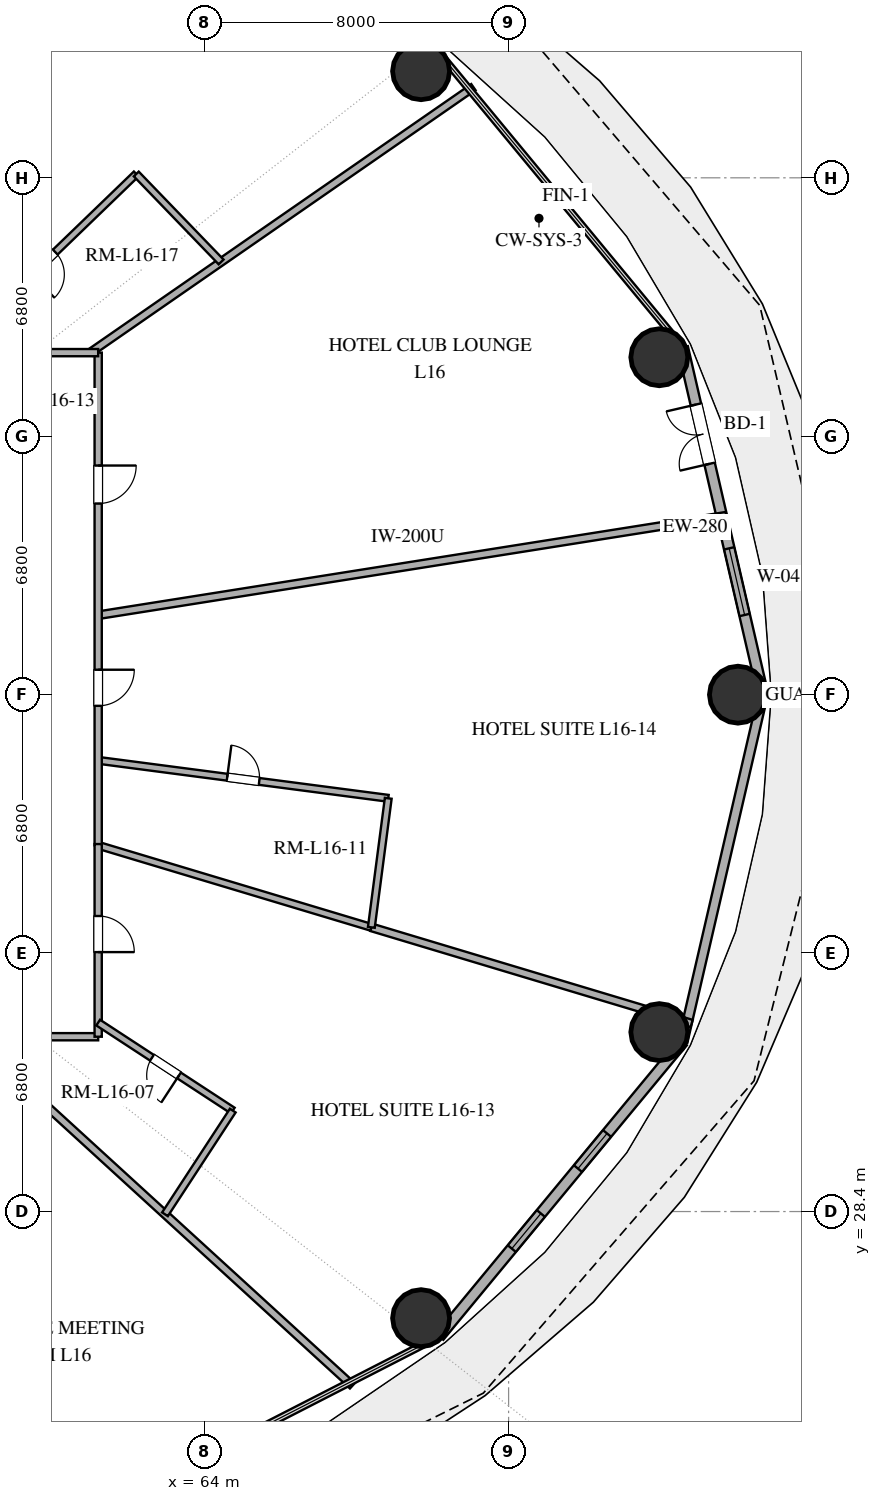
"""IFC4 building model, lengths in metres.
Left out: names, types, materials, properties, quantities, classifications, styles, units other than length and angle.
Written with IfcOpenShell. Run it as: python <this file> out.ifc"""

import sys

from ifc_helpers import new_model, si_unit, direction, frame, frame_2d, origin, origin_2d, place, context, subcontext, project, spatial, rectangle, hollow_circle, extrude, element, fill, save


model = new_model("IFC4")
c1 = context("Model", 3, precision=1e-05, world=origin(), true_north=direction((0.0, 1.0)))
c2 = subcontext(c1, "Body", "Model", "MODEL_VIEW")
j1 = project(units=[si_unit("LENGTHUNIT", "METRE"), si_unit("PLANEANGLEUNIT", "RADIAN")], contexts=[c1])
p1 = place(None, origin())
s1 = spatial("IfcSite", under=j1, at=p1, CompositionType="ELEMENT")
p2 = place(p1, origin())
s2 = spatial("IfcBuilding", under=s1, at=p2, CompositionType="ELEMENT")
p3 = place(p2, frame((0.0, 0.0, 67.8)))
s3 = spatial("IfcBuildingStorey", under=s2, at=p3, CompositionType="ELEMENT", Elevation=67.8)
for number, where, z_axis, x_axis in (
    (1, (78.035, 42.0, 0.0), (0.0, 0.0, 1.0), (1.0, 0.0, 0.0)),
    (2, (75.966, 50.878, 0.0), (0.0, 0.0, 1.0), (1.0, 0.0, 0.0)),
    (3, (69.697, 58.405, 0.0), (0.0, 0.0, 1.0), (1.0, 0.0, 0.0)),
    (4, (69.697, 25.595, 0.0), (0.0, 0.0, 1.0), (1.0, 0.0, 0.0)),
    (5, (75.966, 33.122, 0.0), (0.0, 0.0, 1.0), (1.0, 0.0, 0.0)),
):
    element("IfcColumn", number, at=place(p3, frame(where, z_axis=z_axis, x_axis=x_axis)), inside=s3, PredefinedType="COLUMN", context=c2, shape_type="SweptSolid", body=[
        extrude(hollow_circle(Radius=0.75, WallThickness=0.04, at=origin_2d()), origin(), (0.0, 0.0, 1.0), 3.38),
    ])
p4 = place(p3, frame((78.696, 42.0, 0.0), z_axis=(0.0, 0.0, 1.0), x_axis=(-0.225454452941, 0.974253709076, 0.0)))
e6 = element("IfcWall", 6, at=p4, inside=s3, PredefinedType="SOLIDWALL", context=c2, shape_type="SweptSolid", body=[
    extrude(rectangle(XDim=9.38, YDim=0.28, at=frame_2d((4.69, 0.0))), origin(), (0.0, 0.0, 1.0), 3.38),
])
p5 = place(p4, frame((2.152, 0.0, 0.85)))
e7 = element("IfcOpeningElement", 7, at=p5, cuts=e6, PredefinedType="OPENING", context=c2, shape_type="SweptSolid", body=[
    extrude(rectangle(XDim=1.8, YDim=2.2, at=frame_2d((0.9, 1.1))), frame((0.0, 0.15, 0.0), z_axis=(0.0, -1.0, 0.0), x_axis=(1.0, 0.0, 0.0)), (0.0, 0.0, 1.0), 0.3),
])
p6 = place(p4, frame((6.235, 0.0, 0.0)))
e8 = element("IfcOpeningElement", 8, at=p6, cuts=e6, PredefinedType="OPENING", context=c2, shape_type="SweptSolid", body=[
    extrude(rectangle(XDim=1.6, YDim=2.25, at=frame_2d((0.8, 1.125))), frame((0.0, 0.15, 0.0), z_axis=(0.0, -1.0, 0.0), x_axis=(1.0, 0.0, 0.0)), (0.0, 0.0, 1.0), 0.3),
])
p7 = place(p3, frame((70.174, 58.886, 0.0), z_axis=(0.0, 0.0, 1.0), x_axis=(-0.889853976658, 0.456245438581, 0.0)))
e9 = element("IfcWall", 9, at=p7, inside=s3, PredefinedType="SOLIDWALL", context=c2, shape_type="SweptSolid", body=[
    extrude(rectangle(XDim=11.346, YDim=0.28, at=frame_2d((5.673, 0.0))), origin(), (0.0, 0.0, 1.0), 3.38),
])
p8 = place(p7, frame((3.367, 0.0, 0.85)))
e10 = element("IfcOpeningElement", 10, at=p8, cuts=e9, PredefinedType="OPENING", context=c2, shape_type="SweptSolid", body=[
    extrude(rectangle(XDim=1.5, YDim=2.0, at=frame_2d((0.75, 1.0))), frame((0.0, 0.15, 0.0), z_axis=(0.0, -1.0, 0.0), x_axis=(1.0, 0.0, 0.0)), (0.0, 0.0, 1.0), 0.3),
])
p9 = place(p7, frame((6.629, 0.0, 0.85)))
e11 = element("IfcOpeningElement", 11, at=p9, cuts=e9, PredefinedType="OPENING", context=c2, shape_type="SweptSolid", body=[
    extrude(rectangle(XDim=1.5, YDim=2.0, at=frame_2d((0.75, 1.0))), frame((0.0, 0.15, 0.0), z_axis=(0.0, -1.0, 0.0), x_axis=(1.0, 0.0, 0.0)), (0.0, 0.0, 1.0), 0.3),
])
p10 = place(p3, frame((70.174, 25.114, 0.0), z_axis=(0.0, 0.0, 1.0), x_axis=(0.637296809613, 0.770618437657, 0.0)))
e12 = element("IfcWall", 12, at=p10, inside=s3, PredefinedType="SOLIDWALL", context=c2, shape_type="SweptSolid", body=[
    extrude(rectangle(XDim=10.053, YDim=0.28, at=frame_2d((5.027, 0.0))), origin(), (0.0, 0.0, 1.0), 3.38),
])
p11 = place(p10, frame((2.998, 0.0, 0.85)))
e13 = element("IfcOpeningElement", 13, at=p11, cuts=e12, PredefinedType="OPENING", context=c2, shape_type="SweptSolid", body=[
    extrude(rectangle(XDim=1.2, YDim=1.6, at=frame_2d((0.6, 0.8))), frame((0.0, 0.15, 0.0), z_axis=(0.0, -1.0, 0.0), x_axis=(1.0, 0.0, 0.0)), (0.0, 0.0, 1.0), 0.3),
])
p12 = place(p10, frame((5.73, 0.0, 0.85)))
e14 = element("IfcOpeningElement", 14, at=p12, cuts=e12, PredefinedType="OPENING", context=c2, shape_type="SweptSolid", body=[
    extrude(rectangle(XDim=1.2, YDim=1.6, at=frame_2d((0.6, 0.8))), frame((0.0, 0.15, 0.0), z_axis=(0.0, -1.0, 0.0), x_axis=(1.0, 0.0, 0.0)), (0.0, 0.0, 1.0), 0.3),
])
p13 = place(p3, frame((76.581, 32.862, 0.0), z_axis=(0.0, 0.0, 1.0), x_axis=(0.225454452941, 0.974253709076, 0.0)))
e15 = element("IfcWall", 15, at=p13, inside=s3, PredefinedType="SOLIDWALL", context=c2, shape_type="SweptSolid", body=[
    extrude(rectangle(XDim=9.38, YDim=0.25, at=frame_2d((4.69, 0.0))), origin(), (0.0, 0.0, 1.0), 3.38),
])
p14 = place(p3, frame((61.2, 44.091, 0.0), z_axis=(0.0, 0.0, 1.0), x_axis=(0.987690823911, 0.156418785194, 0.0)))
e16 = element("IfcWall", 16, at=p14, inside=s3, PredefinedType="PARTITIONING", context=c2, shape_type="SweptSolid", body=[
    extrude(rectangle(XDim=16.735, YDim=0.2, at=frame_2d((8.368, 0.0))), origin(), (0.0, 0.0, 1.0), 2.74),
])
p15 = place(p3, frame((76.816, 33.347, 0.0), z_axis=(0.0, 0.0, 1.0), x_axis=(-0.957749889613, 0.287602414708, 0.0)))
e17 = element("IfcWall", 17, at=p15, inside=s3, PredefinedType="PARTITIONING", context=c2, shape_type="SweptSolid", body=[
    extrude(rectangle(XDim=8.8, YDim=0.2, at=frame_2d((4.4, 0.0))), origin(), (0.0, 0.0, 1.0), 2.74),
])
p16 = place(p3, frame((53.107, 51.0, 0.0), z_axis=(0.0, 0.0, 1.0), x_axis=(0.493512300658, 0.869738816599, 0.0)))
e18 = element("IfcWall", 18, at=p16, inside=s3, PredefinedType="PARTITIONING", context=c2, shape_type="SweptSolid", body=[
    extrude(rectangle(XDim=14.938, YDim=0.2, at=frame_2d((7.469, 0.0))), origin(), (0.0, 0.0, 1.0), 2.74),
])
p17 = place(p3, frame((60.991, 51.0, 0.0), z_axis=(0.0, 0.0, 1.0), x_axis=(0.821999402566, 0.569488351226, 0.0)))
e19 = element("IfcWall", 19, at=p17, inside=s3, PredefinedType="PARTITIONING", context=c2, shape_type="SweptSolid", body=[
    extrude(rectangle(XDim=12.266, YDim=0.2, at=frame_2d((6.133, 0.0))), origin(), (0.0, 0.0, 1.0), 2.74),
])
p18 = place(p3, frame((61.2, 40.272, 0.0), z_axis=(0.0, 0.0, 1.0), x_axis=(0.991543548491, -0.129774386708, 0.0)))
e20 = element("IfcWall", 20, at=p18, inside=s3, PredefinedType="PLUMBINGWALL", context=c2, shape_type="SweptSolid", body=[
    extrude(rectangle(XDim=7.698, YDim=0.18, at=frame_2d((3.849, 0.0))), origin(), (0.0, 0.0, 1.0), 2.74),
])
p19 = place(p18, frame((3.424, 0.0, 0.0)))
e21 = element("IfcOpeningElement", 21, at=p19, cuts=e20, PredefinedType="OPENING", context=c2, shape_type="SweptSolid", body=[
    extrude(rectangle(XDim=0.85, YDim=2.1, at=frame_2d((0.425, 1.05))), frame((0.0, 0.1, 0.0), z_axis=(0.0, -1.0, 0.0), x_axis=(1.0, 0.0, 0.0)), (0.0, 0.0, 1.0), 0.2),
])
p20 = place(p3, frame((68.388, 35.878, 0.0), z_axis=(0.0, 0.0, 1.0), x_axis=(-0.95775642604, 0.28758064674, 0.0)))
e22 = element("IfcWall", 22, at=p20, inside=s3, PredefinedType="PLUMBINGWALL", context=c2, shape_type="SweptSolid", body=[
    extrude(rectangle(XDim=7.506, YDim=0.18, at=frame_2d((3.753, 0.0))), origin(), (0.0, 0.0, 1.0), 2.74),
])
p21 = place(p3, frame((57.846, 33.0, 0.0), z_axis=(0.0, 0.0, 1.0), x_axis=(0.738119160364, -0.674670367738, 0.0)))
e23 = element("IfcWall", 23, at=p21, inside=s3, PredefinedType="PARTITIONING", context=c2, shape_type="SweptSolid", body=[
    extrude(rectangle(XDim=13.61, YDim=0.2, at=frame_2d((6.805, 0.0))), origin(), (0.0, 0.0, 1.0), 2.74),
])
p22 = place(p3, frame((61.2, 51.0, 0.0), z_axis=(0.0, 0.0, 1.0), x_axis=(0.0, -1.0, 0.0)))
e24 = element("IfcWall", 24, at=p22, inside=s3, PredefinedType="PARTITIONING", context=c2, shape_type="SweptSolid", body=[
    extrude(rectangle(XDim=12.964, YDim=0.19, at=frame_2d((6.482, 0.0))), origin(), (0.0, 0.0, 1.0), 2.74),
])
p23 = place(p22, frame((2.971, 0.0, 0.0)))
e25 = element("IfcOpeningElement", 25, at=p23, cuts=e24, PredefinedType="OPENING", context=c2, shape_type="SweptSolid", body=[
    extrude(rectangle(XDim=1.0, YDim=2.2, at=frame_2d((0.5, 1.1))), frame((0.0, 0.105, 0.0), z_axis=(0.0, -1.0, 0.0), x_axis=(1.0, 0.0, 0.0)), (0.0, 0.0, 1.0), 0.21),
])
p24 = place(p22, frame((8.344, 0.0, 0.0)))
e26 = element("IfcOpeningElement", 26, at=p24, cuts=e24, PredefinedType="OPENING", context=c2, shape_type="SweptSolid", body=[
    extrude(rectangle(XDim=0.95, YDim=2.15, at=frame_2d((0.475, 1.075))), frame((0.0, 0.105, 0.0), z_axis=(0.0, -1.0, 0.0), x_axis=(1.0, 0.0, 0.0)), (0.0, 0.0, 1.0), 0.21),
])
p25 = place(p3, frame((62.202, 55.701, 0.0), z_axis=(0.0, 0.0, 1.0), x_axis=(-0.719667322044, -0.69431905172, 0.0)))
e27 = element("IfcWall", 27, at=p25, inside=s3, PredefinedType="PLUMBINGWALL", context=c2, shape_type="SweptSolid", body=[
    extrude(rectangle(XDim=6.771, YDim=0.18, at=frame_2d((3.385, 0.0))), origin(), (0.0, 0.0, 1.0), 2.74),
])
p26 = place(p25, frame((2.96, 0.0, 0.0)))
e28 = element("IfcOpeningElement", 28, at=p26, cuts=e27, PredefinedType="OPENING", context=c2, shape_type="SweptSolid", body=[
    extrude(rectangle(XDim=0.85, YDim=2.1, at=frame_2d((0.425, 1.05))), frame((0.0, 0.1, 0.0), z_axis=(0.0, -1.0, 0.0), x_axis=(1.0, 0.0, 0.0)), (0.0, 0.0, 1.0), 0.2),
])
p27 = place(p3, frame((61.2, 33.0, 0.0), z_axis=(0.0, 0.0, 1.0), x_axis=(-1.0, 0.0, 0.0)))
e29 = element("IfcWall", 29, at=p27, inside=s3, PredefinedType="PARTITIONING", context=c2, shape_type="SweptSolid", body=[
    extrude(rectangle(XDim=13.839, YDim=0.19, at=frame_2d((6.919, 0.0))), origin(), (0.0, 0.0, 1.0), 2.74),
])
p28 = place(p27, frame((5.965, 0.0, 0.0)))
e30 = element("IfcOpeningElement", 30, at=p28, cuts=e29, PredefinedType="OPENING", context=c2, shape_type="SweptSolid", body=[
    extrude(rectangle(XDim=1.0, YDim=2.2, at=frame_2d((0.5, 1.1))), frame((0.0, 0.105, 0.0), z_axis=(0.0, -1.0, 0.0), x_axis=(1.0, 0.0, 0.0)), (0.0, 0.0, 1.0), 0.21),
])
p29 = place(p27, frame((10.493, 0.0, 0.0)))
e31 = element("IfcOpeningElement", 31, at=p29, cuts=e29, PredefinedType="OPENING", context=c2, shape_type="SweptSolid", body=[
    extrude(rectangle(XDim=0.95, YDim=2.15, at=frame_2d((0.475, 1.075))), frame((0.0, 0.105, 0.0), z_axis=(0.0, -1.0, 0.0), x_axis=(1.0, 0.0, 0.0)), (0.0, 0.0, 1.0), 0.21),
])
p30 = place(p3, frame((61.2, 38.07, 0.0), z_axis=(0.0, 0.0, 1.0), x_axis=(0.0, -1.0, 0.0)))
e32 = element("IfcWall", 32, at=p30, inside=s3, PredefinedType="PARTITIONING", context=c2, shape_type="SweptSolid", body=[
    extrude(rectangle(XDim=5.07, YDim=0.19, at=frame_2d((2.535, 0.0))), origin(), (0.0, 0.0, 1.0), 2.74),
])
p31 = place(p30, frame((1.893, 0.0, 0.0)))
e33 = element("IfcOpeningElement", 33, at=p31, cuts=e32, PredefinedType="OPENING", context=c2, shape_type="SweptSolid", body=[
    extrude(rectangle(XDim=0.95, YDim=2.15, at=frame_2d((0.475, 1.075))), frame((0.0, 0.105, 0.0), z_axis=(0.0, -1.0, 0.0), x_axis=(1.0, 0.0, 0.0)), (0.0, 0.0, 1.0), 0.21),
])
p32 = place(p3, frame((51.298, 51.0, 0.0), z_axis=(0.0, 0.0, 1.0), x_axis=(1.0, 0.0, 0.0)))
e34 = element("IfcWall", 34, at=p32, inside=s3, PredefinedType="PARTITIONING", context=c2, shape_type="SweptSolid", body=[
    extrude(rectangle(XDim=9.902, YDim=0.19, at=frame_2d((4.951, 0.0))), origin(), (0.0, 0.0, 1.0), 2.74),
])
p33 = place(p32, frame((3.45, 0.0, 0.0)))
e35 = element("IfcOpeningElement", 35, at=p33, cuts=e34, PredefinedType="OPENING", context=c2, shape_type="SweptSolid", body=[
    extrude(rectangle(XDim=0.95, YDim=2.15, at=frame_2d((0.475, 1.075))), frame((0.0, 0.105, 0.0), z_axis=(0.0, -1.0, 0.0), x_axis=(1.0, 0.0, 0.0)), (0.0, 0.0, 1.0), 0.21),
])
p34 = place(p3, frame((64.742, 31.056, 0.0), z_axis=(0.0, 0.0, 1.0), x_axis=(-0.837031612028, 0.5471545307, 0.0)))
e36 = element("IfcWall", 36, at=p34, inside=s3, PredefinedType="PLUMBINGWALL", context=c2, shape_type="SweptSolid", body=[
    extrude(rectangle(XDim=4.231, YDim=0.18, at=frame_2d((2.116, 0.0))), origin(), (0.0, 0.0, 1.0), 2.74),
])
p35 = place(p34, frame((1.691, 0.0, 0.0)))
e37 = element("IfcOpeningElement", 37, at=p35, cuts=e36, PredefinedType="OPENING", context=c2, shape_type="SweptSolid", body=[
    extrude(rectangle(XDim=0.85, YDim=2.1, at=frame_2d((0.425, 1.05))), frame((0.0, 0.1, 0.0), z_axis=(0.0, -1.0, 0.0), x_axis=(1.0, 0.0, 0.0)), (0.0, 0.0, 1.0), 0.2),
])
p36 = place(p3, frame((68.833, 39.273, 0.0), z_axis=(0.0, 0.0, 1.0), x_axis=(-0.129823772588, -0.991537083558, 0.0)))
e38 = element("IfcWall", 38, at=p36, inside=s3, PredefinedType="PLUMBINGWALL", context=c2, shape_type="SweptSolid", body=[
    extrude(rectangle(XDim=3.425, YDim=0.18, at=frame_2d((1.712, 0.0))), origin(), (0.0, 0.0, 1.0), 2.74),
])
p37 = place(p3, frame((62.958, 28.328, 0.0), z_axis=(0.0, 0.0, 1.0), x_axis=(0.547176717469, 0.837017108463, 0.0)))
e39 = element("IfcWall", 39, at=p37, inside=s3, PredefinedType="PLUMBINGWALL", context=c2, shape_type="SweptSolid", body=[
    extrude(rectangle(XDim=3.26, YDim=0.18, at=frame_2d((1.63, 0.0))), origin(), (0.0, 0.0, 1.0), 2.74),
])
p38 = place(p3, frame((64.435, 53.386, 0.0), z_axis=(0.0, 0.0, 1.0), x_axis=(-0.694278833189, 0.719706121821, 0.0)))
e40 = element("IfcWall", 40, at=p38, inside=s3, PredefinedType="PLUMBINGWALL", context=c2, shape_type="SweptSolid", body=[
    extrude(rectangle(XDim=3.217, YDim=0.18, at=frame_2d((1.608, 0.0))), origin(), (0.0, 0.0, 1.0), 2.74),
])
p39 = place(p5, origin())
e41 = element("IfcWindow", 41, at=p39, inside=s3, PartitioningType="SINGLE_PANEL", PredefinedType="WINDOW", context=c2, shape_type="SweptSolid", body=[
    extrude(rectangle(XDim=1.8, YDim=2.2, at=frame_2d((0.9, 1.1))), frame((0.0, 0.03, 0.0), z_axis=(0.0, -1.0, 0.0), x_axis=(1.0, 0.0, 0.0)), (0.0, 0.0, 1.0), 0.06),
])
fill(e7, e41)
p40 = place(p6, origin())
e42 = element("IfcDoor", 42, at=p40, inside=s3, OperationType="DOUBLE_DOOR_SINGLE_SWING", PredefinedType="DOOR", context=c2, shape_type="SweptSolid", body=[
    extrude(rectangle(XDim=1.6, YDim=2.25, at=frame_2d((0.8, 1.125))), frame((0.0, 0.025, 0.0), z_axis=(0.0, -1.0, 0.0), x_axis=(1.0, 0.0, 0.0)), (0.0, 0.0, 1.0), 0.05),
])
fill(e8, e42)
p41 = place(p11, origin())
e43 = element("IfcWindow", 43, at=p41, inside=s3, PartitioningType="SINGLE_PANEL", PredefinedType="WINDOW", context=c2, shape_type="SweptSolid", body=[
    extrude(rectangle(XDim=1.2, YDim=1.6, at=frame_2d((0.6, 0.8))), frame((0.0, 0.03, 0.0), z_axis=(0.0, -1.0, 0.0), x_axis=(1.0, 0.0, 0.0)), (0.0, 0.0, 1.0), 0.06),
])
fill(e13, e43)
p42 = place(p12, origin())
e44 = element("IfcWindow", 44, at=p42, inside=s3, PartitioningType="SINGLE_PANEL", PredefinedType="WINDOW", context=c2, shape_type="SweptSolid", body=[
    extrude(rectangle(XDim=1.2, YDim=1.6, at=frame_2d((0.6, 0.8))), frame((0.0, 0.03, 0.0), z_axis=(0.0, -1.0, 0.0), x_axis=(1.0, 0.0, 0.0)), (0.0, 0.0, 1.0), 0.06),
])
fill(e14, e44)
p43 = place(p19, origin())
e45 = element("IfcDoor", 45, at=p43, inside=s3, OperationType="SINGLE_SWING_LEFT", PredefinedType="DOOR", context=c2, shape_type="SweptSolid", body=[
    extrude(rectangle(XDim=0.85, YDim=2.1, at=frame_2d((0.425, 1.05))), frame((0.0, 0.025, 0.0), z_axis=(0.0, -1.0, 0.0), x_axis=(1.0, 0.0, 0.0)), (0.0, 0.0, 1.0), 0.05),
])
fill(e21, e45)
p44 = place(p23, origin())
e46 = element("IfcDoor", 46, at=p44, inside=s3, OperationType="SINGLE_SWING_LEFT", PredefinedType="DOOR", context=c2, shape_type="SweptSolid", body=[
    extrude(rectangle(XDim=1.0, YDim=2.2, at=frame_2d((0.5, 1.1))), frame((0.0, 0.025, 0.0), z_axis=(0.0, -1.0, 0.0), x_axis=(1.0, 0.0, 0.0)), (0.0, 0.0, 1.0), 0.05),
])
fill(e25, e46)
p45 = place(p24, origin())
e47 = element("IfcDoor", 47, at=p45, inside=s3, OperationType="SINGLE_SWING_LEFT", PredefinedType="DOOR", context=c2, shape_type="SweptSolid", body=[
    extrude(rectangle(XDim=0.95, YDim=2.15, at=frame_2d((0.475, 1.075))), frame((0.0, 0.025, 0.0), z_axis=(0.0, -1.0, 0.0), x_axis=(1.0, 0.0, 0.0)), (0.0, 0.0, 1.0), 0.05),
])
fill(e26, e47)
p46 = place(p26, origin())
e48 = element("IfcDoor", 48, at=p46, inside=s3, OperationType="SINGLE_SWING_RIGHT", PredefinedType="DOOR", context=c2, shape_type="SweptSolid", body=[
    extrude(rectangle(XDim=0.85, YDim=2.1, at=frame_2d((0.425, 1.05))), frame((0.0, 0.025, 0.0), z_axis=(0.0, -1.0, 0.0), x_axis=(1.0, 0.0, 0.0)), (0.0, 0.0, 1.0), 0.05),
])
fill(e28, e48)
p47 = place(p31, origin())
e49 = element("IfcDoor", 49, at=p47, inside=s3, OperationType="SINGLE_SWING_RIGHT", PredefinedType="DOOR", context=c2, shape_type="SweptSolid", body=[
    extrude(rectangle(XDim=0.95, YDim=2.15, at=frame_2d((0.475, 1.075))), frame((0.0, 0.025, 0.0), z_axis=(0.0, -1.0, 0.0), x_axis=(1.0, 0.0, 0.0)), (0.0, 0.0, 1.0), 0.05),
])
fill(e33, e49)
p48 = place(p35, origin())
e50 = element("IfcDoor", 50, at=p48, inside=s3, OperationType="SINGLE_SWING_LEFT", PredefinedType="DOOR", context=c2, shape_type="SweptSolid", body=[
    extrude(rectangle(XDim=0.85, YDim=2.1, at=frame_2d((0.425, 1.05))), frame((0.0, 0.025, 0.0), z_axis=(0.0, -1.0, 0.0), x_axis=(1.0, 0.0, 0.0)), (0.0, 0.0, 1.0), 0.05),
])
fill(e37, e50)
save(model, sys.argv[1])
